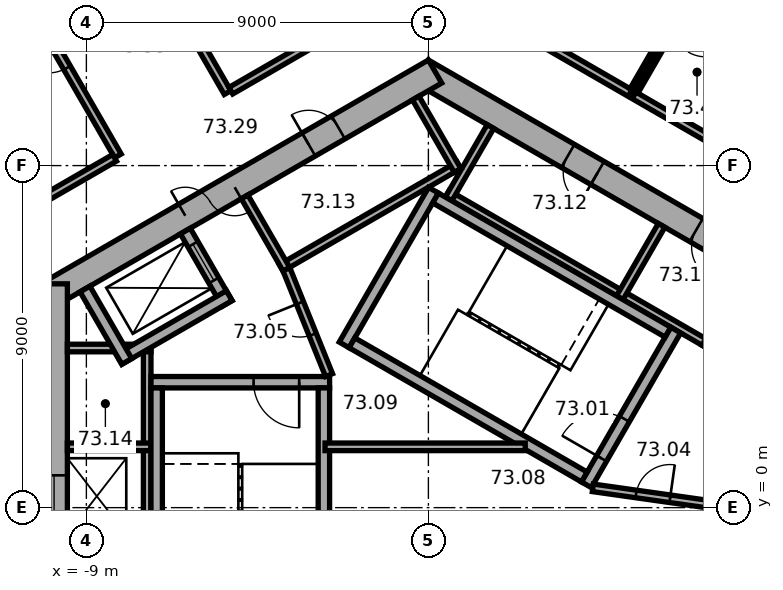
"""IFC4 building model, lengths in metres.
Left out: names, types, materials, properties, quantities, classifications, styles, units other than length and angle.
Written with IfcOpenShell. Run it as: python <this file> out.ifc"""

import sys

from ifc_helpers import new_model, si_unit, direction, frame, frame_2d, origin, place, context, subcontext, project, spatial, rectangle, extrude, element, fill, save


model = new_model("IFC4")
c1 = context("Model", 3, precision=1e-05, world=origin(), true_north=direction((0.0, 1.0)))
c2 = subcontext(c1, "Body", "Model", "MODEL_VIEW")
j1 = project(units=[si_unit("LENGTHUNIT", "METRE"), si_unit("PLANEANGLEUNIT", "RADIAN")], contexts=[c1])
p1 = place(None, origin())
s1 = spatial("IfcSite", under=j1, at=p1, CompositionType="ELEMENT")
p2 = place(p1, origin())
s2 = spatial("IfcBuilding", under=s1, at=p2, CompositionType="ELEMENT")
p3 = place(p2, frame((0.0, 0.0, 296.8)))
s3 = spatial("IfcBuildingStorey", under=s2, at=p3, CompositionType="ELEMENT", Elevation=296.8)
p4 = place(p3, frame((10.025, 5.586, 0.0), z_axis=(0.0, 0.0, 1.0), x_axis=(-0.866026453023, 0.499998182661, 0.0)))
e1 = element("IfcWall", 1, at=p4, inside=s3, PredefinedType="SHEAR", context=c2, shape_type="SweptSolid", body=[
    extrude(rectangle(XDim=11.778, YDim=0.7, at=frame_2d((5.889, 0.0))), origin(), (0.0, 0.0, 1.0), 3.7),
])
p5 = place(p4, frame((2.539, 0.0, 0.0)))
e2 = element("IfcOpeningElement", 2, at=p5, cuts=e1, PredefinedType="OPENING", context=c2, shape_type="SweptSolid", body=[
    extrude(rectangle(XDim=0.9, YDim=2.1, at=frame_2d((0.45, 1.05))), frame((0.0, 0.36, 0.0), z_axis=(0.0, -1.0, 0.0), x_axis=(1.0, 0.0, 0.0)), (0.0, 0.0, 1.0), 0.72),
])
p6 = place(p4, frame((6.439, 0.0, 0.0)))
e3 = element("IfcOpeningElement", 3, at=p6, cuts=e1, PredefinedType="OPENING", context=c2, shape_type="SweptSolid", body=[
    extrude(rectangle(XDim=0.9, YDim=2.1, at=frame_2d((0.45, 1.05))), frame((0.0, 0.36, 0.0), z_axis=(0.0, -1.0, 0.0), x_axis=(1.0, 0.0, 0.0)), (0.0, 0.0, 1.0), 0.72),
])
p7 = place(p3, frame((0.175, 11.475, 0.0), z_axis=(0.0, 0.0, 1.0), x_axis=(-0.866026453023, -0.499998182661, 0.0)))
e4 = element("IfcWall", 4, at=p7, inside=s3, PredefinedType="SHEAR", context=c2, shape_type="SweptSolid", body=[
    extrude(rectangle(XDim=11.778, YDim=0.7, at=frame_2d((5.889, 0.0))), origin(), (0.0, 0.0, 1.0), 3.7),
])
p8 = place(p7, frame((6.089, 0.0, 0.0)))
e5 = element("IfcOpeningElement", 5, at=p8, cuts=e4, PredefinedType="OPENING", context=c2, shape_type="SweptSolid", body=[
    extrude(rectangle(XDim=1.5, YDim=2.1, at=frame_2d((0.75, 1.05))), frame((0.0, 0.36, 0.0), z_axis=(0.0, -1.0, 0.0), x_axis=(1.0, 0.0, 0.0)), (0.0, 0.0, 1.0), 0.72),
])
p9 = place(p7, frame((2.939, 0.0, 0.0)))
e6 = element("IfcOpeningElement", 6, at=p9, cuts=e4, PredefinedType="OPENING", context=c2, shape_type="SweptSolid", body=[
    extrude(rectangle(XDim=0.9, YDim=2.1, at=frame_2d((0.45, 1.05))), frame((0.0, 0.36, 0.0), z_axis=(0.0, -1.0, 0.0), x_axis=(1.0, 0.0, 0.0)), (0.0, 0.0, 1.0), 0.72),
])
p10 = place(p3, frame((-9.85, 5.889, 0.0), z_axis=(0.0, 0.0, 1.0), x_axis=(0.0, -1.0, 0.0)))
e7 = element("IfcWall", 7, at=p10, inside=s3, PredefinedType="SHEAR", context=c2, shape_type="SweptSolid", body=[
    extrude(rectangle(XDim=11.778, YDim=0.7, at=frame_2d((5.889, 0.0))), origin(), (0.0, 0.0, 1.0), 3.7),
])
p11 = place(p10, frame((5.039, 0.0, 0.0)))
e8 = element("IfcOpeningElement", 8, at=p11, cuts=e7, PredefinedType="OPENING", context=c2, shape_type="SweptSolid", body=[
    extrude(rectangle(XDim=1.1, YDim=2.1, at=frame_2d((0.55, 1.05))), frame((0.0, 0.36, 0.0), z_axis=(0.0, -1.0, 0.0), x_axis=(1.0, 0.0, 0.0)), (0.0, 0.0, 1.0), 0.72),
])
p12 = place(p10, frame((7.639, 0.0, 0.0)))
e9 = element("IfcOpeningElement", 9, at=p12, cuts=e7, PredefinedType="OPENING", context=c2, shape_type="SweptSolid", body=[
    extrude(rectangle(XDim=1.1, YDim=2.1, at=frame_2d((0.55, 1.05))), frame((0.0, 0.36, 0.0), z_axis=(0.0, -1.0, 0.0), x_axis=(1.0, 0.0, 0.0)), (0.0, 0.0, 1.0), 0.72),
])
p13 = place(p3, frame((-2.624, 20.713, 0.0), z_axis=(0.0, 0.0, 1.0), x_axis=(-0.866026460444, -0.499998169808, 0.0)))
e10 = element("IfcWall", 10, at=p13, inside=s3, PredefinedType="STANDARD", context=c2, shape_type="SweptSolid", body=[
    extrude(rectangle(XDim=17.731, YDim=0.2, at=frame_2d((8.866, 0.0))), origin(), (0.0, 0.0, 1.0), 3.7),
])
p14 = place(p13, frame((1.203, 0.0, 0.9)))
e11 = element("IfcOpeningElement", 11, at=p14, cuts=e10, PredefinedType="OPENING", context=c2, shape_type="SweptSolid", body=[
    extrude(rectangle(XDim=2.0, YDim=2.0, at=frame_2d((1.0, 1.0))), frame((0.0, 0.11, 0.0), z_axis=(0.0, -1.0, 0.0), x_axis=(1.0, 0.0, 0.0)), (0.0, 0.0, 1.0), 0.22),
])
p15 = place(p13, frame((4.535, 0.0, 0.9)))
e12 = element("IfcOpeningElement", 12, at=p15, cuts=e10, PredefinedType="OPENING", context=c2, shape_type="SweptSolid", body=[
    extrude(rectangle(XDim=2.0, YDim=2.0, at=frame_2d((1.0, 1.0))), frame((0.0, 0.11, 0.0), z_axis=(0.0, -1.0, 0.0), x_axis=(1.0, 0.0, 0.0)), (0.0, 0.0, 1.0), 0.22),
])
p16 = place(p13, frame((7.867, 0.0, 0.9)))
e13 = element("IfcOpeningElement", 13, at=p16, cuts=e10, PredefinedType="OPENING", context=c2, shape_type="SweptSolid", body=[
    extrude(rectangle(XDim=2.0, YDim=2.0, at=frame_2d((1.0, 1.0))), frame((0.0, 0.11, 0.0), z_axis=(0.0, -1.0, 0.0), x_axis=(1.0, 0.0, 0.0)), (0.0, 0.0, 1.0), 0.22),
])
p17 = place(p13, frame((11.198, 0.0, 0.9)))
e14 = element("IfcOpeningElement", 14, at=p17, cuts=e10, PredefinedType="OPENING", context=c2, shape_type="SweptSolid", body=[
    extrude(rectangle(XDim=2.0, YDim=2.0, at=frame_2d((1.0, 1.0))), frame((0.0, 0.11, 0.0), z_axis=(0.0, -1.0, 0.0), x_axis=(1.0, 0.0, 0.0)), (0.0, 0.0, 1.0), 0.22),
])
p18 = place(p13, frame((14.53, 0.0, 0.9)))
e15 = element("IfcOpeningElement", 15, at=p18, cuts=e10, PredefinedType="OPENING", context=c2, shape_type="SweptSolid", body=[
    extrude(rectangle(XDim=2.0, YDim=2.0, at=frame_2d((1.0, 1.0))), frame((0.0, 0.11, 0.0), z_axis=(0.0, -1.0, 0.0), x_axis=(1.0, 0.0, 0.0)), (0.0, 0.0, 1.0), 0.22),
])
p19 = place(p3, frame((7.424, 4.259, 0.0), z_axis=(0.0, 0.0, 1.0), x_axis=(-0.866026010844, 0.49999894854, 0.0)))
e16 = element("IfcWall", 16, at=p19, inside=s3, PredefinedType="PARTITIONING", context=c2, shape_type="SweptSolid", body=[
    extrude(rectangle(XDim=8.0, YDim=0.2, at=frame_2d((4.0, 0.0))), origin(), (0.0, 0.0, 1.0), 3.35),
])
for number, where, z_axis, x_axis in (
    (17, (7.287, 4.222, 0.0), (0.0, 0.0, 1.0), (0.5, 0.866, 0.0)),
    (18, (5.036, 5.522, 0.0), (0.0, 0.0, 1.0), (0.5, 0.866, 0.0)),
    (19, (0.532, 8.122, 0.0), (0.0, 0.0, 1.0), (0.5, 0.866, 0.0)),
):
    element("IfcWall", number, at=place(p3, frame(where, z_axis=z_axis, x_axis=x_axis)), inside=s3, PredefinedType="PARTITIONING", context=c2, shape_type="SweptSolid", body=[
        extrude(rectangle(XDim=2.2, YDim=0.2, at=frame_2d((1.1, 0.0))), origin(), (0.0, 0.0, 1.0), 3.35),
    ])
p20 = place(p3, frame((0.803, 9.009, 0.0), z_axis=(0.0, 0.0, 1.0), x_axis=(-0.866028230842, -0.499995103361, 0.0)))
e20 = element("IfcWall", 20, at=p20, inside=s3, PredefinedType="PARTITIONING", context=c2, shape_type="SweptSolid", body=[
    extrude(rectangle(XDim=5.4, YDim=0.2, at=frame_2d((2.7, 0.0))), origin(), (0.0, 0.0, 1.0), 3.35),
])
p21 = place(p3, frame((0.767, 8.872, 0.0), z_axis=(0.0, 0.0, 1.0), x_axis=(-0.499994660107, 0.866028486751, 0.0)))
e21 = element("IfcWall", 21, at=p21, inside=s3, PredefinedType="PARTITIONING", context=c2, shape_type="SweptSolid", body=[
    extrude(rectangle(XDim=2.2, YDim=0.2, at=frame_2d((1.1, 0.0))), origin(), (0.0, 0.0, 1.0), 3.35),
])
p22 = place(p3, frame((-3.737, 6.272, 0.0), z_axis=(0.0, 0.0, 1.0), x_axis=(-0.50002983664, 0.866008176907, 0.0)))
e22 = element("IfcWall", 22, at=p22, inside=s3, PredefinedType="PARTITIONING", context=c2, shape_type="SweptSolid", body=[
    extrude(rectangle(XDim=2.2, YDim=0.2, at=frame_2d((1.1, 0.0))), origin(), (0.0, 0.0, 1.0), 3.35),
])
p23 = place(p3, frame((-7.4, 4.3, 0.0), z_axis=(0.0, 0.0, 1.0), x_axis=(0.0, -1.0, 0.0)))
e23 = element("IfcWall", 23, at=p23, inside=s3, PredefinedType="PARTITIONING", context=c2, shape_type="SweptSolid", body=[
    extrude(rectangle(XDim=8.0, YDim=0.2, at=frame_2d((4.0, 0.0))), origin(), (0.0, 0.0, 1.0), 3.35),
])
for number, where, z_axis, x_axis in (
    (24, (-7.3, 4.2, 0.0), (0.0, 0.0, 1.0), (-1.0, 0.0, 0.0)),
    (25, (-7.3, 1.6, 0.0), (0.0, 0.0, 1.0), (-1.0, 0.0, 0.0)),
):
    element("IfcWall", number, at=place(p3, frame(where, z_axis=z_axis, x_axis=x_axis)), inside=s3, PredefinedType="PARTITIONING", context=c2, shape_type="SweptSolid", body=[
        extrude(rectangle(XDim=2.2, YDim=0.2, at=frame_2d((1.1, 0.0))), origin(), (0.0, 0.0, 1.0), 3.35),
    ])
p24 = place(p3, frame((4.158, 0.602, 0.0), z_axis=(0.0, 0.0, 1.0), x_axis=(0.499977259774, 0.866038532462, 0.0)))
e26 = element("IfcWall", 26, at=p24, inside=s3, PredefinedType="SHEAR", context=c2, shape_type="SweptSolid", body=[
    extrude(rectangle(XDim=4.7, YDim=0.3, at=frame_2d((2.35, 0.0))), origin(), (0.0, 0.0, 1.0), 3.35),
])
p25 = place(p24, frame((0.8, 0.0, 0.0)))
e27 = element("IfcOpeningElement", 27, at=p25, cuts=e26, PredefinedType="OPENING", context=c2, shape_type="SweptSolid", body=[
    extrude(rectangle(XDim=1.2, YDim=2.1, at=frame_2d((0.6, 1.05))), frame((0.0, 0.16, 0.0), z_axis=(0.0, -1.0, 0.0), x_axis=(1.0, 0.0, 0.0)), (0.0, 0.0, 1.0), 0.32),
])
p26 = place(p3, frame((-2.216, 4.282, 0.0), z_axis=(0.0, 0.0, 1.0), x_axis=(0.499977259774, 0.866038532462, 0.0)))
e28 = element("IfcWall", 28, at=p26, inside=s3, PredefinedType="SHEAR", context=c2, shape_type="SweptSolid", body=[
    extrude(rectangle(XDim=4.7, YDim=0.3, at=frame_2d((2.35, 0.0))), origin(), (0.0, 0.0, 1.0), 3.35),
])
for number, where, z_axis, x_axis in (
    (29, (4.103, 0.807, 0.0), (0.0, 0.0, 1.0), (-0.866, 0.5, 0.0)),
    (30, (6.303, 4.617, 0.0), (0.0, 0.0, 1.0), (-0.866, 0.5, 0.0)),
):
    element("IfcWall", number, at=place(p3, frame(where, z_axis=z_axis, x_axis=x_axis)), inside=s3, PredefinedType="SHEAR", context=c2, shape_type="SweptSolid", body=[
        extrude(rectangle(XDim=7.06, YDim=0.3, at=frame_2d((3.53, 0.0))), origin(), (0.0, 0.0, 1.0), 3.35),
    ])
p27 = place(p3, frame((-2.6, 3.3, 0.0), z_axis=(0.0, 0.0, 1.0), x_axis=(-1.0, 0.0, 0.0)))
e31 = element("IfcWall", 31, at=p27, inside=s3, PredefinedType="SHEAR", context=c2, shape_type="SweptSolid", body=[
    extrude(rectangle(XDim=4.7, YDim=0.3, at=frame_2d((2.35, 0.0))), origin(), (0.0, 0.0, 1.0), 3.35),
])
p28 = place(p27, frame((0.8, 0.0, 0.0)))
e32 = element("IfcOpeningElement", 32, at=p28, cuts=e31, PredefinedType="OPENING", context=c2, shape_type="SweptSolid", body=[
    extrude(rectangle(XDim=1.2, YDim=2.1, at=frame_2d((0.6, 1.05))), frame((0.0, 0.16, 0.0), z_axis=(0.0, -1.0, 0.0), x_axis=(1.0, 0.0, 0.0)), (0.0, 0.0, 1.0), 0.32),
])
for number, where, z_axis, x_axis in (
    (33, (-2.75, 3.15, 0.0), (0.0, 0.0, 1.0), (0.0, -1.0, 0.0)),
    (34, (-7.15, 3.15, 0.0), (0.0, 0.0, 1.0), (0.0, -1.0, 0.0)),
):
    element("IfcWall", number, at=place(p3, frame(where, z_axis=z_axis, x_axis=x_axis)), inside=s3, PredefinedType="SHEAR", context=c2, shape_type="SweptSolid", body=[
        extrude(rectangle(XDim=7.06, YDim=0.3, at=frame_2d((3.53, 0.0))), origin(), (0.0, 0.0, 1.0), 3.35),
    ])
p29 = place(p3, frame((4.327, 0.521, 0.0), z_axis=(0.0, 0.0, 1.0), x_axis=(0.990124376366, -0.14019172346, 0.0)))
e35 = element("IfcWall", 35, at=p29, inside=s3, PredefinedType="PARTITIONING", context=c2, shape_type="SweptSolid", body=[
    extrude(rectangle(XDim=3.002, YDim=0.2, at=frame_2d((1.501, 0.0))), origin(), (0.0, 0.0, 1.0), 3.35),
])
p30 = place(p29, frame((1.15, 0.0, 0.0)))
e36 = element("IfcOpeningElement", 36, at=p30, cuts=e35, PredefinedType="OPENING", context=c2, shape_type="SweptSolid", body=[
    extrude(rectangle(XDim=0.9, YDim=2.1, at=frame_2d((0.45, 1.05))), frame((0.0, 0.11, 0.0), z_axis=(0.0, -1.0, 0.0), x_axis=(1.0, 0.0, 0.0)), (0.0, 0.0, 1.0), 0.22),
])
p31 = place(p3, frame((-5.295, 5.372, 0.0), z_axis=(0.0, 0.0, 1.0), x_axis=(-0.500077893725, 0.86598042715, 0.0)))
e37 = element("IfcWall", 37, at=p31, inside=s3, PredefinedType="SHEAR", context=c2, shape_type="SweptSolid", body=[
    extrude(rectangle(XDim=2.2, YDim=0.3, at=frame_2d((1.1, 0.0))), origin(), (0.0, 0.0, 1.0), 3.35),
])
p32 = place(p31, frame((0.7, 0.0, 0.0)))
e38 = element("IfcOpeningElement", 38, at=p32, cuts=e37, PredefinedType="OPENING", context=c2, shape_type="SweptSolid", body=[
    extrude(rectangle(XDim=1.1, YDim=2.1, at=frame_2d((0.55, 1.05))), frame((0.0, 0.16, 0.0), z_axis=(0.0, -1.0, 0.0), x_axis=(1.0, 0.0, 0.0)), (0.0, 0.0, 1.0), 0.32),
])
p33 = place(p3, frame((-5.24, 5.577, 0.0), z_axis=(0.0, 0.0, 1.0), x_axis=(-0.866014461049, -0.500018952895, 0.0)))
e39 = element("IfcWall", 39, at=p33, inside=s3, PredefinedType="SHEAR", context=c2, shape_type="SweptSolid", body=[
    extrude(rectangle(XDim=3.35, YDim=0.3, at=frame_2d((1.675, 0.0))), origin(), (0.0, 0.0, 1.0), 3.35),
])
p34 = place(p3, frame((-7.937, 3.847, 0.0), z_axis=(0.0, 0.0, 1.0), x_axis=(-0.50002983664, 0.866008176907, 0.0)))
e40 = element("IfcWall", 40, at=p34, inside=s3, PredefinedType="SHEAR", context=c2, shape_type="SweptSolid", body=[
    extrude(rectangle(XDim=2.2, YDim=0.3, at=frame_2d((1.1, 0.0))), origin(), (0.0, 0.0, 1.0), 3.35),
])
p35 = place(p3, frame((-2.615, 3.487, 0.0), z_axis=(0.0, 0.0, 1.0), x_axis=(-0.373576831041, 0.92759924068, 0.0)))
e41 = element("IfcWall", 41, at=p35, inside=s3, PredefinedType="PARTITIONING", context=c2, shape_type="SweptSolid", body=[
    extrude(rectangle(XDim=3.002, YDim=0.2, at=frame_2d((1.501, 0.0))), origin(), (0.0, 0.0, 1.0), 3.35),
])
p36 = place(p35, frame((1.15, 0.0, 0.0)))
e42 = element("IfcOpeningElement", 42, at=p36, cuts=e41, PredefinedType="OPENING", context=c2, shape_type="SweptSolid", body=[
    extrude(rectangle(XDim=0.9, YDim=2.1, at=frame_2d((0.45, 1.05))), frame((0.0, 0.11, 0.0), z_axis=(0.0, -1.0, 0.0), x_axis=(1.0, 0.0, 0.0)), (0.0, 0.0, 1.0), 0.22),
])
p37 = place(p3, frame((-2.72, 1.6, 0.0), z_axis=(0.0, 0.0, 1.0), x_axis=(1.0, 0.0, 0.0)))
e43 = element("IfcWall", 43, at=p37, inside=s3, PredefinedType="PARTITIONING", context=c2, shape_type="SweptSolid", body=[
    extrude(rectangle(XDim=5.269, YDim=0.2, at=frame_2d((2.634, 0.0))), origin(), (0.0, 0.0, 1.0), 3.35),
])
p38 = place(p3, frame((-11.345, 14.754, 0.0), z_axis=(0.0, 0.0, 1.0), x_axis=(0.500005339912, -0.866022320763, 0.0)))
e44 = element("IfcWall", 44, at=p38, inside=s3, PredefinedType="PARTITIONING", context=c2, shape_type="SweptSolid", body=[
    extrude(rectangle(XDim=6.35, YDim=0.2, at=frame_2d((3.175, 0.0))), origin(), (0.0, 0.0, 1.0), 3.35),
])
p39 = place(p38, frame((2.675, 0.0, 0.0)))
e45 = element("IfcOpeningElement", 45, at=p39, cuts=e44, PredefinedType="OPENING", context=c2, shape_type="SweptSolid", body=[
    extrude(rectangle(XDim=1.0, YDim=2.1, at=frame_2d((0.5, 1.05))), frame((0.0, 0.11, 0.0), z_axis=(0.0, -1.0, 0.0), x_axis=(1.0, 0.0, 0.0)), (0.0, 0.0, 1.0), 0.22),
])
p40 = place(p3, frame((-8.46, 16.42, 0.0), z_axis=(0.0, 0.0, 1.0), x_axis=(0.500005339912, -0.866022320763, 0.0)))
e46 = element("IfcWall", 46, at=p40, inside=s3, PredefinedType="PARTITIONING", context=c2, shape_type="SweptSolid", body=[
    extrude(rectangle(XDim=6.35, YDim=0.2, at=frame_2d((3.175, 0.0))), origin(), (0.0, 0.0, 1.0), 2.65),
])
p41 = place(p40, frame((2.675, 0.0, 0.0)))
e47 = element("IfcOpeningElement", 47, at=p41, cuts=e46, PredefinedType="OPENING", context=c2, shape_type="SweptSolid", body=[
    extrude(rectangle(XDim=1.0, YDim=2.1, at=frame_2d((0.5, 1.05))), frame((0.0, 0.11, 0.0), z_axis=(0.0, -1.0, 0.0), x_axis=(1.0, 0.0, 0.0)), (0.0, 0.0, 1.0), 0.22),
])
p42 = place(p3, frame((-8.257, 9.205, 0.0), z_axis=(0.0, 0.0, 1.0), x_axis=(-0.866030838723, -0.499990586292, 0.0)))
e48 = element("IfcWall", 48, at=p42, inside=s3, PredefinedType="PARTITIONING", context=c2, shape_type="SweptSolid", body=[
    extrude(rectangle(XDim=3.231, YDim=0.2, at=frame_2d((1.616, 0.0))), origin(), (0.0, 0.0, 1.0), 3.35),
])
p43 = place(p3, frame((-0.95, 13.423, 0.0), z_axis=(0.0, 0.0, 1.0), x_axis=(-0.86603557629, -0.499982380289, 0.0)))
e49 = element("IfcWall", 49, at=p43, inside=s3, PredefinedType="PARTITIONING", context=c2, shape_type="SweptSolid", body=[
    extrude(rectangle(XDim=4.906, YDim=0.2, at=frame_2d((2.453, 0.0))), origin(), (0.0, 0.0, 1.0), 3.35),
])
p44 = place(p3, frame((5.308, 10.907, 0.0), z_axis=(0.0, 0.0, 1.0), x_axis=(-0.866028394472, 0.499994819941, 0.0)))
e50 = element("IfcWall", 50, at=p44, inside=s3, PredefinedType="PARTITIONING", context=c2, shape_type="SweptSolid", body=[
    extrude(rectangle(XDim=4.992, YDim=0.2, at=frame_2d((2.496, 0.0))), origin(), (0.0, 0.0, 1.0), 3.35),
])
p45 = place(p3, frame((5.461, 10.934, 0.0), z_axis=(0.0, 0.0, 1.0), x_axis=(0.500004234368, 0.866022959057, 0.0)))
e51 = element("IfcWall", 51, at=p45, inside=s3, PredefinedType="PARTITIONING", context=c2, shape_type="SweptSolid", body=[
    extrude(rectangle(XDim=2.5, YDim=0.12, at=frame_2d((1.25, 0.0))), origin(), (0.0, 0.0, 1.0), 3.35),
])
p46 = place(p3, frame((6.763, 13.069, 0.0), z_axis=(0.0, 0.0, 1.0), x_axis=(0.866019511163, -0.500010206181, 0.0)))
e52 = element("IfcWall", 52, at=p46, inside=s3, PredefinedType="PARTITIONING", context=c2, shape_type="SweptSolid", body=[
    extrude(rectangle(XDim=2.13, YDim=0.12, at=frame_2d((1.065, 0.0))), origin(), (0.0, 0.0, 1.0), 3.35),
])
p47 = place(p46, frame((0.615, 0.0, 0.0)))
e53 = element("IfcOpeningElement", 53, at=p47, cuts=e52, PredefinedType="OPENING", context=c2, shape_type="SweptSolid", body=[
    extrude(rectangle(XDim=0.9, YDim=2.1, at=frame_2d((0.45, 1.05))), frame((0.0, 0.07, 0.0), z_axis=(0.0, -1.0, 0.0), x_axis=(1.0, 0.0, 0.0)), (0.0, 0.0, 1.0), 0.14),
])
p48 = place(p3, frame((7.077, 13.973, 0.0), z_axis=(0.0, 0.0, 1.0), x_axis=(-0.499955923987, -0.866050849587, 0.0)))
e54 = element("IfcWall", 54, at=p48, inside=s3, PredefinedType="PARTITIONING", context=c2, shape_type="SweptSolid", body=[
    extrude(rectangle(XDim=3.44, YDim=0.12, at=frame_2d((1.72, 0.0))), origin(), (0.0, 0.0, 1.0), 3.35),
])
p49 = place(p3, frame((7.317, 9.748, 0.0), z_axis=(0.0, 0.0, 1.0), x_axis=(-0.866028486751, 0.499994660107, 0.0)))
e55 = element("IfcWall", 55, at=p49, inside=s3, PredefinedType="PARTITIONING", context=c2, shape_type="SweptSolid", body=[
    extrude(rectangle(XDim=2.2, YDim=0.2, at=frame_2d((1.1, 0.0))), origin(), (0.0, 0.0, 1.0), 3.35),
])
p50 = place(p8, origin())
e56 = element("IfcDoor", 56, at=p50, inside=s3, OperationType="DOUBLE_DOOR_SINGLE_SWING", PredefinedType="DOOR", context=c2, shape_type="SweptSolid", body=[
    extrude(rectangle(XDim=1.5, YDim=2.1, at=frame_2d((0.75, 1.05))), frame((0.0, 0.025, 0.0), z_axis=(0.0, -1.0, 0.0), x_axis=(1.0, 0.0, 0.0)), (0.0, 0.0, 1.0), 0.05),
])
fill(e5, e56)
p51 = place(p25, origin())
e57 = element("IfcDoor", 57, at=p51, inside=s3, OperationType="SINGLE_SWING_RIGHT", PredefinedType="DOOR", context=c2, shape_type="SweptSolid", body=[
    extrude(rectangle(XDim=1.2, YDim=2.1, at=frame_2d((0.6, 1.05))), frame((0.0, 0.025, 0.0), z_axis=(0.0, -1.0, 0.0), x_axis=(1.0, 0.0, 0.0)), (0.0, 0.0, 1.0), 0.05),
])
fill(e27, e57)
p52 = place(p28, origin())
e58 = element("IfcDoor", 58, at=p52, inside=s3, OperationType="SINGLE_SWING_RIGHT", PredefinedType="DOOR", context=c2, shape_type="SweptSolid", body=[
    extrude(rectangle(XDim=1.2, YDim=2.1, at=frame_2d((0.6, 1.05))), frame((0.0, 0.025, 0.0), z_axis=(0.0, -1.0, 0.0), x_axis=(1.0, 0.0, 0.0)), (0.0, 0.0, 1.0), 0.05),
])
fill(e32, e58)
p53 = place(p30, origin())
e59 = element("IfcDoor", 59, at=p53, inside=s3, OperationType="SINGLE_SWING_LEFT", PredefinedType="DOOR", context=c2, shape_type="SweptSolid", body=[
    extrude(rectangle(XDim=0.9, YDim=2.1, at=frame_2d((0.45, 1.05))), frame((0.0, 0.025, 0.0), z_axis=(0.0, -1.0, 0.0), x_axis=(1.0, 0.0, 0.0)), (0.0, 0.0, 1.0), 0.05),
])
fill(e36, e59)
p54 = place(p36, origin())
e60 = element("IfcDoor", 60, at=p54, inside=s3, OperationType="SINGLE_SWING_LEFT", PredefinedType="DOOR", context=c2, shape_type="SweptSolid", body=[
    extrude(rectangle(XDim=0.9, YDim=2.1, at=frame_2d((0.45, 1.05))), frame((0.0, 0.025, 0.0), z_axis=(0.0, -1.0, 0.0), x_axis=(1.0, 0.0, 0.0)), (0.0, 0.0, 1.0), 0.05),
])
fill(e42, e60)
p55 = place(p5, origin())
e61 = element("IfcDoor", 61, at=p55, inside=s3, OperationType="SINGLE_SWING_LEFT", PredefinedType="DOOR", context=c2, shape_type="SweptSolid", body=[
    extrude(rectangle(XDim=0.9, YDim=2.1, at=frame_2d((0.45, 1.05))), frame((0.0, 0.025, 0.0), z_axis=(0.0, -1.0, 0.0), x_axis=(1.0, 0.0, 0.0)), (0.0, 0.0, 1.0), 0.05),
])
fill(e2, e61)
p56 = place(p6, origin())
e62 = element("IfcDoor", 62, at=p56, inside=s3, OperationType="SINGLE_SWING_LEFT", PredefinedType="DOOR", context=c2, shape_type="SweptSolid", body=[
    extrude(rectangle(XDim=0.9, YDim=2.1, at=frame_2d((0.45, 1.05))), frame((0.0, 0.025, 0.0), z_axis=(0.0, -1.0, 0.0), x_axis=(1.0, 0.0, 0.0)), (0.0, 0.0, 1.0), 0.05),
])
fill(e3, e62)
p57 = place(p9, origin())
e63 = element("IfcDoor", 63, at=p57, inside=s3, OperationType="SINGLE_SWING_LEFT", PredefinedType="DOOR", context=c2, shape_type="SweptSolid", body=[
    extrude(rectangle(XDim=0.9, YDim=2.1, at=frame_2d((0.45, 1.05))), frame((0.0, 0.025, 0.0), z_axis=(0.0, -1.0, 0.0), x_axis=(1.0, 0.0, 0.0)), (0.0, 0.0, 1.0), 0.05),
])
fill(e6, e63)
p58 = place(p32, origin())
e64 = element("IfcDoor", 64, at=p58, inside=s3, OperationType="DOUBLE_DOOR_SLIDING", PredefinedType="DOOR", context=c2, shape_type="SweptSolid", body=[
    extrude(rectangle(XDim=1.1, YDim=2.1, at=frame_2d((0.55, 1.05))), frame((0.0, 0.025, 0.0), z_axis=(0.0, -1.0, 0.0), x_axis=(1.0, 0.0, 0.0)), (0.0, 0.0, 1.0), 0.05),
])
fill(e38, e64)
p59 = place(p11, origin())
e65 = element("IfcDoor", 65, at=p59, inside=s3, OperationType="DOUBLE_DOOR_SLIDING", PredefinedType="DOOR", context=c2, shape_type="SweptSolid", body=[
    extrude(rectangle(XDim=1.1, YDim=2.1, at=frame_2d((0.55, 1.05))), frame((0.0, 0.025, 0.0), z_axis=(0.0, -1.0, 0.0), x_axis=(1.0, 0.0, 0.0)), (0.0, 0.0, 1.0), 0.05),
])
fill(e8, e65)
p60 = place(p39, origin())
e66 = element("IfcDoor", 66, at=p60, inside=s3, OperationType="SINGLE_SWING_LEFT", PredefinedType="DOOR", context=c2, shape_type="SweptSolid", body=[
    extrude(rectangle(XDim=1.0, YDim=2.1, at=frame_2d((0.5, 1.05))), frame((0.0, 0.025, 0.0), z_axis=(0.0, -1.0, 0.0), x_axis=(1.0, 0.0, 0.0)), (0.0, 0.0, 1.0), 0.05),
])
fill(e45, e66)
save(model, sys.argv[1])
